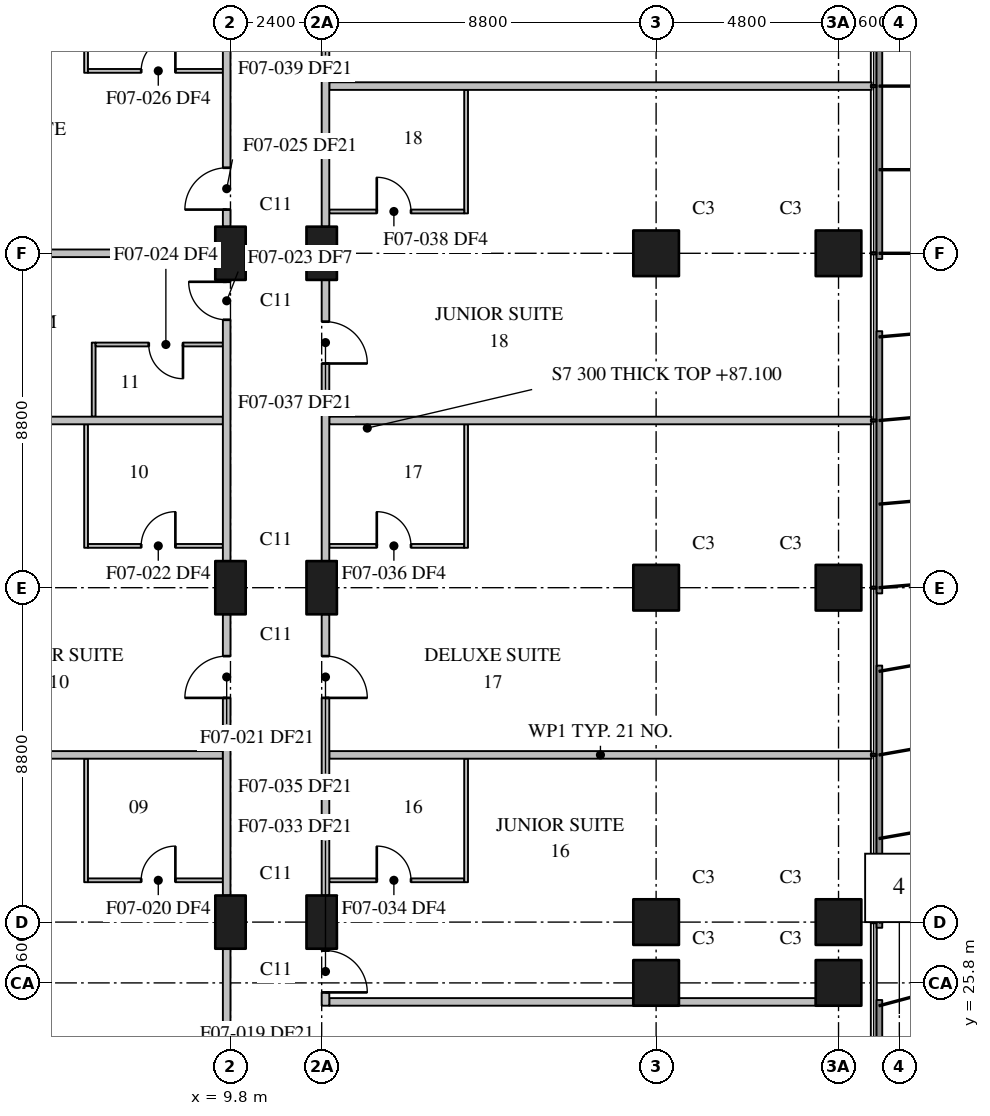
"""IFC4 building model, lengths in metres.
Left out: names, types, materials, properties, quantities, classifications, styles, units other than length and angle.
Written with IfcOpenShell. Run it as: python <this file> out.ifc"""

import sys

from ifc_helpers import new_model, si_unit, direction, frame, frame_2d, origin, origin_2d, place, context, subcontext, project, spatial, rectangle, extrude, element, fill, save


model = new_model("IFC4")
c1 = context("Model", 3, precision=1e-05, world=origin(), true_north=direction((0.0, 1.0)))
c2 = subcontext(c1, "Body", "Model", "MODEL_VIEW")
j1 = project(units=[si_unit("LENGTHUNIT", "METRE"), si_unit("PLANEANGLEUNIT", "RADIAN")], contexts=[c1])
p1 = place(None, origin())
s1 = spatial("IfcSite", under=j1, at=p1, CompositionType="ELEMENT")
p2 = place(p1, origin())
s2 = spatial("IfcBuilding", under=s1, at=p2, CompositionType="ELEMENT")
p3 = place(p2, frame((0.0, 0.0, 87.1)))
s3 = spatial("IfcBuildingStorey", under=s2, at=p3, CompositionType="ELEMENT", Elevation=87.1)
for number, where, z_axis, x_axis in (
    (1, (9.8, 27.4, 0.0), (0.0, 0.0, 1.0), (0.0, 1.0, 0.0)),
    (2, (9.8, 36.2, 0.0), (0.0, 0.0, 1.0), (0.0, 1.0, 0.0)),
    (3, (9.8, 45.0, 0.0), (0.0, 0.0, 1.0), (0.0, 1.0, 0.0)),
    (4, (12.2, 27.4, 0.0), (0.0, 0.0, 1.0), (0.0, 1.0, 0.0)),
    (5, (12.2, 36.2, 0.0), (0.0, 0.0, 1.0), (0.0, 1.0, 0.0)),
    (6, (12.2, 45.0, 0.0), (0.0, 0.0, 1.0), (0.0, 1.0, 0.0)),
):
    element("IfcColumn", number, at=place(p3, frame(where, z_axis=z_axis, x_axis=x_axis)), inside=s3, PredefinedType="COLUMN", context=c2, shape_type="SweptSolid", body=[
        extrude(rectangle(XDim=1.4, YDim=0.8, at=origin_2d()), origin(), (0.0, 0.0, 1.0), 3.7),
    ])
for number, where, z_axis, x_axis in (
    (7, (21.0, 25.8, 0.0), (0.0, 0.0, 1.0), (1.0, 0.0, 0.0)),
    (8, (21.0, 27.4, 0.0), (0.0, 0.0, 1.0), (1.0, 0.0, 0.0)),
    (9, (21.0, 36.2, 0.0), (0.0, 0.0, 1.0), (1.0, 0.0, 0.0)),
    (10, (21.0, 45.0, 0.0), (0.0, 0.0, 1.0), (1.0, 0.0, 0.0)),
    (11, (25.8, 25.8, 0.0), (0.0, 0.0, 1.0), (1.0, 0.0, 0.0)),
    (12, (25.8, 27.4, 0.0), (0.0, 0.0, 1.0), (1.0, 0.0, 0.0)),
    (13, (25.8, 36.2, 0.0), (0.0, 0.0, 1.0), (1.0, 0.0, 0.0)),
    (14, (25.8, 45.0, 0.0), (0.0, 0.0, 1.0), (1.0, 0.0, 0.0)),
):
    element("IfcColumn", number, at=place(p3, frame(where, z_axis=z_axis, x_axis=x_axis)), inside=s3, PredefinedType="COLUMN", context=c2, shape_type="SweptSolid", body=[
        extrude(rectangle(XDim=1.2, YDim=1.2, at=origin_2d()), origin(), (0.0, 0.0, 1.0), 3.7),
    ])
p4 = place(p3, frame((9.7, 21.6, 0.0), z_axis=(0.0, 0.0, 1.0), x_axis=(0.0, 1.0, 0.0)))
e15 = element("IfcWall", 15, at=p4, inside=s3, PredefinedType="PARTITIONING", context=c2, shape_type="SweptSolid", body=[
    extrude(rectangle(XDim=5.1, YDim=0.2, at=frame_2d((2.55, 0.0))), origin(), (0.0, 0.0, 1.0), 3.4),
])
p5 = place(p4, frame((0.7, 0.0, 0.0)))
e16 = element("IfcOpeningElement", 16, at=p5, cuts=e15, PredefinedType="OPENING", context=c2, shape_type="SweptSolid", body=[
    extrude(rectangle(XDim=1.1, YDim=2.1, at=frame_2d((0.55, 1.05))), frame((0.0, 0.11, 0.0), z_axis=(0.0, -1.0, 0.0), x_axis=(1.0, 0.0, 0.0)), (0.0, 0.0, 1.0), 0.22),
])
p6 = place(p3, frame((9.7, 28.1, 0.0), z_axis=(0.0, 0.0, 1.0), x_axis=(0.0, 1.0, 0.0)))
e17 = element("IfcWall", 17, at=p6, inside=s3, PredefinedType="PARTITIONING", context=c2, shape_type="SweptSolid", body=[
    extrude(rectangle(XDim=7.4, YDim=0.2, at=frame_2d((3.7, 0.0))), origin(), (0.0, 0.0, 1.0), 3.4),
])
p7 = place(p6, frame((5.2, 0.0, 0.0)))
e18 = element("IfcOpeningElement", 18, at=p7, cuts=e17, PredefinedType="OPENING", context=c2, shape_type="SweptSolid", body=[
    extrude(rectangle(XDim=1.1, YDim=2.1, at=frame_2d((0.55, 1.05))), frame((0.0, 0.11, 0.0), z_axis=(0.0, -1.0, 0.0), x_axis=(1.0, 0.0, 0.0)), (0.0, 0.0, 1.0), 0.22),
])
p8 = place(p3, frame((9.7, 36.9, 0.0), z_axis=(0.0, 0.0, 1.0), x_axis=(0.0, 1.0, 0.0)))
e19 = element("IfcWall", 19, at=p8, inside=s3, PredefinedType="PARTITIONING", context=c2, shape_type="SweptSolid", body=[
    extrude(rectangle(XDim=7.4, YDim=0.2, at=frame_2d((3.7, 0.0))), origin(), (0.0, 0.0, 1.0), 3.4),
])
p9 = place(p8, frame((6.35, 0.0, 0.0)))
e20 = element("IfcOpeningElement", 20, at=p9, cuts=e19, PredefinedType="OPENING", context=c2, shape_type="SweptSolid", body=[
    extrude(rectangle(XDim=1.0, YDim=2.1, at=frame_2d((0.5, 1.05))), frame((0.0, 0.11, 0.0), z_axis=(0.0, -1.0, 0.0), x_axis=(1.0, 0.0, 0.0)), (0.0, 0.0, 1.0), 0.22),
])
p10 = place(p3, frame((9.7, 45.7, 0.0), z_axis=(0.0, 0.0, 1.0), x_axis=(0.0, 1.0, 0.0)))
e21 = element("IfcWall", 21, at=p10, inside=s3, PredefinedType="PARTITIONING", context=c2, shape_type="SweptSolid", body=[
    extrude(rectangle(XDim=7.4, YDim=0.2, at=frame_2d((3.7, 0.0))), origin(), (0.0, 0.0, 1.0), 3.4),
])
p11 = place(p10, frame((0.45, 0.0, 0.0)))
e22 = element("IfcOpeningElement", 22, at=p11, cuts=e21, PredefinedType="OPENING", context=c2, shape_type="SweptSolid", body=[
    extrude(rectangle(XDim=1.1, YDim=2.1, at=frame_2d((0.55, 1.05))), frame((0.0, 0.11, 0.0), z_axis=(0.0, -1.0, 0.0), x_axis=(1.0, 0.0, 0.0)), (0.0, 0.0, 1.0), 0.22),
])
p12 = place(p3, frame((0.31, 31.8, 0.0), z_axis=(0.0, 0.0, 1.0), x_axis=(1.0, 0.0, 0.0)))
e23 = element("IfcWall", 23, at=p12, inside=s3, PredefinedType="PARTITIONING", context=c2, shape_type="SweptSolid", body=[
    extrude(rectangle(XDim=9.29, YDim=0.2, at=frame_2d((4.645, 0.0))), origin(), (0.0, 0.0, 1.0), 3.4),
])
p13 = place(p3, frame((12.4, 31.8, 0.0), z_axis=(0.0, 0.0, 1.0), x_axis=(1.0, 0.0, 0.0)))
e24 = element("IfcWall", 24, at=p13, inside=s3, PredefinedType="PARTITIONING", context=c2, shape_type="SweptSolid", body=[
    extrude(rectangle(XDim=14.27, YDim=0.2, at=frame_2d((7.135, 0.0))), origin(), (0.0, 0.0, 1.0), 3.4),
])
p14 = place(p3, frame((0.31, 40.6, 0.0), z_axis=(0.0, 0.0, 1.0), x_axis=(1.0, 0.0, 0.0)))
e25 = element("IfcWall", 25, at=p14, inside=s3, PredefinedType="PARTITIONING", context=c2, shape_type="SweptSolid", body=[
    extrude(rectangle(XDim=9.29, YDim=0.2, at=frame_2d((4.645, 0.0))), origin(), (0.0, 0.0, 1.0), 3.4),
])
p15 = place(p3, frame((12.4, 40.6, 0.0), z_axis=(0.0, 0.0, 1.0), x_axis=(1.0, 0.0, 0.0)))
e26 = element("IfcWall", 26, at=p15, inside=s3, PredefinedType="PARTITIONING", context=c2, shape_type="SweptSolid", body=[
    extrude(rectangle(XDim=14.27, YDim=0.2, at=frame_2d((7.135, 0.0))), origin(), (0.0, 0.0, 1.0), 3.4),
])
p16 = place(p3, frame((1.6, 45.0, 0.0), z_axis=(0.0, 0.0, 1.0), x_axis=(1.0, 0.0, 0.0)))
e27 = element("IfcWall", 27, at=p16, inside=s3, PredefinedType="PARTITIONING", context=c2, shape_type="SweptSolid", body=[
    extrude(rectangle(XDim=7.8, YDim=0.2, at=frame_2d((3.9, 0.0))), origin(), (0.0, 0.0, 1.0), 3.4),
])
p17 = place(p3, frame((12.3, 26.7, 0.0), z_axis=(0.0, 0.0, 1.0), x_axis=(0.0, -1.0, 0.0)))
e28 = element("IfcWall", 28, at=p17, inside=s3, PredefinedType="PARTITIONING", context=c2, shape_type="SweptSolid", body=[
    extrude(rectangle(XDim=1.5, YDim=0.2, at=frame_2d((0.75, 0.0))), origin(), (0.0, 0.0, 1.0), 3.4),
])
p18 = place(p17, frame((0.05, 0.0, 0.0)))
e29 = element("IfcOpeningElement", 29, at=p18, cuts=e28, PredefinedType="OPENING", context=c2, shape_type="SweptSolid", body=[
    extrude(rectangle(XDim=1.1, YDim=2.1, at=frame_2d((0.55, 1.05))), frame((0.0, 0.11, 0.0), z_axis=(0.0, -1.0, 0.0), x_axis=(1.0, 0.0, 0.0)), (0.0, 0.0, 1.0), 0.22),
])
p19 = place(p3, frame((12.3, 35.5, 0.0), z_axis=(0.0, 0.0, 1.0), x_axis=(0.0, -1.0, 0.0)))
e30 = element("IfcWall", 30, at=p19, inside=s3, PredefinedType="PARTITIONING", context=c2, shape_type="SweptSolid", body=[
    extrude(rectangle(XDim=7.4, YDim=0.2, at=frame_2d((3.7, 0.0))), origin(), (0.0, 0.0, 1.0), 3.4),
])
p20 = place(p19, frame((1.1, 0.0, 0.0)))
e31 = element("IfcOpeningElement", 31, at=p20, cuts=e30, PredefinedType="OPENING", context=c2, shape_type="SweptSolid", body=[
    extrude(rectangle(XDim=1.1, YDim=2.1, at=frame_2d((0.55, 1.05))), frame((0.0, 0.11, 0.0), z_axis=(0.0, -1.0, 0.0), x_axis=(1.0, 0.0, 0.0)), (0.0, 0.0, 1.0), 0.22),
])
p21 = place(p3, frame((12.3, 44.3, 0.0), z_axis=(0.0, 0.0, 1.0), x_axis=(0.0, -1.0, 0.0)))
e32 = element("IfcWall", 32, at=p21, inside=s3, PredefinedType="PARTITIONING", context=c2, shape_type="SweptSolid", body=[
    extrude(rectangle(XDim=7.4, YDim=0.2, at=frame_2d((3.7, 0.0))), origin(), (0.0, 0.0, 1.0), 3.4),
])
p22 = place(p21, frame((1.1, 0.0, 0.0)))
e33 = element("IfcOpeningElement", 33, at=p22, cuts=e32, PredefinedType="OPENING", context=c2, shape_type="SweptSolid", body=[
    extrude(rectangle(XDim=1.1, YDim=2.1, at=frame_2d((0.55, 1.05))), frame((0.0, 0.11, 0.0), z_axis=(0.0, -1.0, 0.0), x_axis=(1.0, 0.0, 0.0)), (0.0, 0.0, 1.0), 0.22),
])
p23 = place(p3, frame((12.3, 53.1, 0.0), z_axis=(0.0, 0.0, 1.0), x_axis=(0.0, -1.0, 0.0)))
e34 = element("IfcWall", 34, at=p23, inside=s3, PredefinedType="PARTITIONING", context=c2, shape_type="SweptSolid", body=[
    extrude(rectangle(XDim=7.4, YDim=0.2, at=frame_2d((3.7, 0.0))), origin(), (0.0, 0.0, 1.0), 3.4),
])
p24 = place(p23, frame((1.1, 0.0, 0.0)))
e35 = element("IfcOpeningElement", 35, at=p24, cuts=e34, PredefinedType="OPENING", context=c2, shape_type="SweptSolid", body=[
    extrude(rectangle(XDim=1.1, YDim=2.1, at=frame_2d((0.55, 1.05))), frame((0.0, 0.11, 0.0), z_axis=(0.0, -1.0, 0.0), x_axis=(1.0, 0.0, 0.0)), (0.0, 0.0, 1.0), 0.22),
])
p25 = place(p3, frame((12.4, 25.3, 0.0), z_axis=(0.0, 0.0, 1.0), x_axis=(1.0, 0.0, 0.0)))
e36 = element("IfcWall", 36, at=p25, inside=s3, PredefinedType="PARTITIONING", context=c2, shape_type="SweptSolid", body=[
    extrude(rectangle(XDim=8.0, YDim=0.2, at=frame_2d((4.0, 0.0))), origin(), (0.0, 0.0, 1.0), 3.4),
])
p26 = place(p3, frame((21.6, 25.3, 0.0), z_axis=(0.0, 0.0, 1.0), x_axis=(1.0, 0.0, 0.0)))
e37 = element("IfcWall", 37, at=p26, inside=s3, PredefinedType="PARTITIONING", context=c2, shape_type="SweptSolid", body=[
    extrude(rectangle(XDim=3.6, YDim=0.2, at=frame_2d((1.8, 0.0))), origin(), (0.0, 0.0, 1.0), 3.4),
])
p27 = place(p3, frame((12.4, 49.4, 0.0), z_axis=(0.0, 0.0, 1.0), x_axis=(1.0, 0.0, 0.0)))
e38 = element("IfcWall", 38, at=p27, inside=s3, PredefinedType="PARTITIONING", context=c2, shape_type="SweptSolid", body=[
    extrude(rectangle(XDim=14.27, YDim=0.2, at=frame_2d((7.135, 0.0))), origin(), (0.0, 0.0, 1.0), 3.4),
])
p28 = place(p3, frame((6.2, 40.7, 0.0), z_axis=(0.0, 0.0, 1.0), x_axis=(0.0, 1.0, 0.0)))
e39 = element("IfcWall", 39, at=p28, inside=s3, PredefinedType="PARTITIONING", context=c2, shape_type="SweptSolid", body=[
    extrude(rectangle(XDim=1.95, YDim=0.1, at=frame_2d((0.975, 0.0))), origin(), (0.0, 0.0, 1.0), 3.4),
])
for number, where, z_axis, x_axis in (
    (40, (6.0, 28.45, 0.0), (0.0, 0.0, 1.0), (0.0, 1.0, 0.0)),
    (41, (6.0, 37.25, 0.0), (0.0, 0.0, 1.0), (0.0, 1.0, 0.0)),
):
    element("IfcWall", number, at=place(p3, frame(where, z_axis=z_axis, x_axis=x_axis)), inside=s3, PredefinedType="PARTITIONING", context=c2, shape_type="SweptSolid", body=[
        extrude(rectangle(XDim=3.25, YDim=0.1, at=frame_2d((1.625, 0.0))), origin(), (0.0, 0.0, 1.0), 3.4),
    ])
p29 = place(p3, frame((6.0, 49.75, 0.0), z_axis=(0.0, 0.0, 1.0), x_axis=(0.0, 1.0, 0.0)))
e42 = element("IfcWall", 42, at=p29, inside=s3, PredefinedType="PARTITIONING", context=c2, shape_type="SweptSolid", body=[
    extrude(rectangle(XDim=3.4, YDim=0.1, at=frame_2d((1.7, 0.0))), origin(), (0.0, 0.0, 1.0), 3.4),
])
p30 = place(p3, frame((6.05, 28.5, 0.0), z_axis=(0.0, 0.0, 1.0), x_axis=(1.0, 0.0, 0.0)))
e43 = element("IfcWall", 43, at=p30, inside=s3, PredefinedType="PARTITIONING", context=c2, shape_type="SweptSolid", body=[
    extrude(rectangle(XDim=3.55, YDim=0.1, at=frame_2d((1.775, 0.0))), origin(), (0.0, 0.0, 1.0), 3.4),
])
p31 = place(p30, frame((1.4, 0.0, 0.0)))
e44 = element("IfcOpeningElement", 44, at=p31, cuts=e43, PredefinedType="OPENING", context=c2, shape_type="SweptSolid", body=[
    extrude(rectangle(XDim=0.9, YDim=2.1, at=frame_2d((0.45, 1.05))), frame((0.0, 0.06, 0.0), z_axis=(0.0, -1.0, 0.0), x_axis=(1.0, 0.0, 0.0)), (0.0, 0.0, 1.0), 0.12),
])
p32 = place(p3, frame((12.4, 28.5, 0.0), z_axis=(0.0, 0.0, 1.0), x_axis=(1.0, 0.0, 0.0)))
e45 = element("IfcWall", 45, at=p32, inside=s3, PredefinedType="PARTITIONING", context=c2, shape_type="SweptSolid", body=[
    extrude(rectangle(XDim=3.55, YDim=0.1, at=frame_2d((1.775, 0.0))), origin(), (0.0, 0.0, 1.0), 3.4),
])
p33 = place(p32, frame((1.25, 0.0, 0.0)))
e46 = element("IfcOpeningElement", 46, at=p33, cuts=e45, PredefinedType="OPENING", context=c2, shape_type="SweptSolid", body=[
    extrude(rectangle(XDim=0.9, YDim=2.1, at=frame_2d((0.45, 1.05))), frame((0.0, 0.06, 0.0), z_axis=(0.0, -1.0, 0.0), x_axis=(1.0, 0.0, 0.0)), (0.0, 0.0, 1.0), 0.12),
])
p34 = place(p3, frame((6.05, 37.3, 0.0), z_axis=(0.0, 0.0, 1.0), x_axis=(1.0, 0.0, 0.0)))
e47 = element("IfcWall", 47, at=p34, inside=s3, PredefinedType="PARTITIONING", context=c2, shape_type="SweptSolid", body=[
    extrude(rectangle(XDim=3.55, YDim=0.1, at=frame_2d((1.775, 0.0))), origin(), (0.0, 0.0, 1.0), 3.4),
])
p35 = place(p34, frame((1.4, 0.0, 0.0)))
e48 = element("IfcOpeningElement", 48, at=p35, cuts=e47, PredefinedType="OPENING", context=c2, shape_type="SweptSolid", body=[
    extrude(rectangle(XDim=0.9, YDim=2.1, at=frame_2d((0.45, 1.05))), frame((0.0, 0.06, 0.0), z_axis=(0.0, -1.0, 0.0), x_axis=(1.0, 0.0, 0.0)), (0.0, 0.0, 1.0), 0.12),
])
p36 = place(p3, frame((12.4, 37.3, 0.0), z_axis=(0.0, 0.0, 1.0), x_axis=(1.0, 0.0, 0.0)))
e49 = element("IfcWall", 49, at=p36, inside=s3, PredefinedType="PARTITIONING", context=c2, shape_type="SweptSolid", body=[
    extrude(rectangle(XDim=3.55, YDim=0.1, at=frame_2d((1.775, 0.0))), origin(), (0.0, 0.0, 1.0), 3.4),
])
p37 = place(p36, frame((1.25, 0.0, 0.0)))
e50 = element("IfcOpeningElement", 50, at=p37, cuts=e49, PredefinedType="OPENING", context=c2, shape_type="SweptSolid", body=[
    extrude(rectangle(XDim=0.9, YDim=2.1, at=frame_2d((0.45, 1.05))), frame((0.0, 0.06, 0.0), z_axis=(0.0, -1.0, 0.0), x_axis=(1.0, 0.0, 0.0)), (0.0, 0.0, 1.0), 0.12),
])
p38 = place(p3, frame((9.6, 42.6, 0.0), z_axis=(0.0, 0.0, 1.0), x_axis=(-1.0, 0.0, 0.0)))
e51 = element("IfcWall", 51, at=p38, inside=s3, PredefinedType="PARTITIONING", context=c2, shape_type="SweptSolid", body=[
    extrude(rectangle(XDim=3.35, YDim=0.1, at=frame_2d((1.675, 0.0))), origin(), (0.0, 0.0, 1.0), 3.4),
])
p39 = place(p38, frame((1.05, 0.0, 0.0)))
e52 = element("IfcOpeningElement", 52, at=p39, cuts=e51, PredefinedType="OPENING", context=c2, shape_type="SweptSolid", body=[
    extrude(rectangle(XDim=0.9, YDim=2.1, at=frame_2d((0.45, 1.05))), frame((0.0, 0.06, 0.0), z_axis=(0.0, -1.0, 0.0), x_axis=(1.0, 0.0, 0.0)), (0.0, 0.0, 1.0), 0.12),
])
p40 = place(p3, frame((6.05, 49.8, 0.0), z_axis=(0.0, 0.0, 1.0), x_axis=(1.0, 0.0, 0.0)))
e53 = element("IfcWall", 53, at=p40, inside=s3, PredefinedType="PARTITIONING", context=c2, shape_type="SweptSolid", body=[
    extrude(rectangle(XDim=3.55, YDim=0.1, at=frame_2d((1.775, 0.0))), origin(), (0.0, 0.0, 1.0), 3.4),
])
p41 = place(p40, frame((1.4, 0.0, 0.0)))
e54 = element("IfcOpeningElement", 54, at=p41, cuts=e53, PredefinedType="OPENING", context=c2, shape_type="SweptSolid", body=[
    extrude(rectangle(XDim=0.9, YDim=2.1, at=frame_2d((0.45, 1.05))), frame((0.0, 0.06, 0.0), z_axis=(0.0, -1.0, 0.0), x_axis=(1.0, 0.0, 0.0)), (0.0, 0.0, 1.0), 0.12),
])
for number, where, z_axis, x_axis in (
    (55, (16.0, 28.45, 0.0), (0.0, 0.0, 1.0), (0.0, 1.0, 0.0)),
    (56, (16.0, 37.25, 0.0), (0.0, 0.0, 1.0), (0.0, 1.0, 0.0)),
    (57, (16.0, 46.05, 0.0), (0.0, 0.0, 1.0), (0.0, 1.0, 0.0)),
):
    element("IfcWall", number, at=place(p3, frame(where, z_axis=z_axis, x_axis=x_axis)), inside=s3, PredefinedType="PARTITIONING", context=c2, shape_type="SweptSolid", body=[
        extrude(rectangle(XDim=3.25, YDim=0.1, at=frame_2d((1.625, 0.0))), origin(), (0.0, 0.0, 1.0), 3.4),
    ])
p42 = place(p3, frame((12.4, 46.1, 0.0), z_axis=(0.0, 0.0, 1.0), x_axis=(1.0, 0.0, 0.0)))
e58 = element("IfcWall", 58, at=p42, inside=s3, PredefinedType="PARTITIONING", context=c2, shape_type="SweptSolid", body=[
    extrude(rectangle(XDim=3.55, YDim=0.1, at=frame_2d((1.775, 0.0))), origin(), (0.0, 0.0, 1.0), 3.4),
])
p43 = place(p42, frame((1.25, 0.0, 0.0)))
e59 = element("IfcOpeningElement", 59, at=p43, cuts=e58, PredefinedType="OPENING", context=c2, shape_type="SweptSolid", body=[
    extrude(rectangle(XDim=0.9, YDim=2.1, at=frame_2d((0.45, 1.05))), frame((0.0, 0.06, 0.0), z_axis=(0.0, -1.0, 0.0), x_axis=(1.0, 0.0, 0.0)), (0.0, 0.0, 1.0), 0.12),
])
p44 = place(p31, origin())
e60 = element("IfcDoor", 60, at=p44, inside=s3, OperationType="SINGLE_SWING_RIGHT", PredefinedType="DOOR", context=c2, shape_type="SweptSolid", body=[
    extrude(rectangle(XDim=0.9, YDim=2.1, at=frame_2d((0.45, 1.05))), frame((0.0, 0.025, 0.0), z_axis=(0.0, -1.0, 0.0), x_axis=(1.0, 0.0, 0.0)), (0.0, 0.0, 1.0), 0.05),
])
fill(e44, e60)
p45 = place(p7, origin())
e61 = element("IfcDoor", 61, at=p45, inside=s3, OperationType="SINGLE_SWING_LEFT", PredefinedType="DOOR", context=c2, shape_type="SweptSolid", body=[
    extrude(rectangle(XDim=1.1, YDim=2.1, at=frame_2d((0.55, 1.05))), frame((0.0, 0.025, 0.0), z_axis=(0.0, -1.0, 0.0), x_axis=(1.0, 0.0, 0.0)), (0.0, 0.0, 1.0), 0.05),
])
fill(e18, e61)
p46 = place(p35, origin())
e62 = element("IfcDoor", 62, at=p46, inside=s3, OperationType="SINGLE_SWING_RIGHT", PredefinedType="DOOR", context=c2, shape_type="SweptSolid", body=[
    extrude(rectangle(XDim=0.9, YDim=2.1, at=frame_2d((0.45, 1.05))), frame((0.0, 0.025, 0.0), z_axis=(0.0, -1.0, 0.0), x_axis=(1.0, 0.0, 0.0)), (0.0, 0.0, 1.0), 0.05),
])
fill(e48, e62)
p47 = place(p9, origin())
e63 = element("IfcDoor", 63, at=p47, inside=s3, OperationType="SINGLE_SWING_RIGHT", PredefinedType="DOOR", context=c2, shape_type="SweptSolid", body=[
    extrude(rectangle(XDim=1.0, YDim=2.1, at=frame_2d((0.5, 1.05))), frame((0.0, 0.025, 0.0), z_axis=(0.0, -1.0, 0.0), x_axis=(1.0, 0.0, 0.0)), (0.0, 0.0, 1.0), 0.05),
])
fill(e20, e63)
p48 = place(p39, origin())
e64 = element("IfcDoor", 64, at=p48, inside=s3, OperationType="SINGLE_SWING_LEFT", PredefinedType="DOOR", context=c2, shape_type="SweptSolid", body=[
    extrude(rectangle(XDim=0.9, YDim=2.1, at=frame_2d((0.45, 1.05))), frame((0.0, 0.025, 0.0), z_axis=(0.0, -1.0, 0.0), x_axis=(1.0, 0.0, 0.0)), (0.0, 0.0, 1.0), 0.05),
])
fill(e52, e64)
p49 = place(p11, origin())
e65 = element("IfcDoor", 65, at=p49, inside=s3, OperationType="SINGLE_SWING_LEFT", PredefinedType="DOOR", context=c2, shape_type="SweptSolid", body=[
    extrude(rectangle(XDim=1.1, YDim=2.1, at=frame_2d((0.55, 1.05))), frame((0.0, 0.025, 0.0), z_axis=(0.0, -1.0, 0.0), x_axis=(1.0, 0.0, 0.0)), (0.0, 0.0, 1.0), 0.05),
])
fill(e22, e65)
p50 = place(p41, origin())
e66 = element("IfcDoor", 66, at=p50, inside=s3, OperationType="SINGLE_SWING_RIGHT", PredefinedType="DOOR", context=c2, shape_type="SweptSolid", body=[
    extrude(rectangle(XDim=0.9, YDim=2.1, at=frame_2d((0.45, 1.05))), frame((0.0, 0.025, 0.0), z_axis=(0.0, -1.0, 0.0), x_axis=(1.0, 0.0, 0.0)), (0.0, 0.0, 1.0), 0.05),
])
fill(e54, e66)
p51 = place(p18, origin())
e67 = element("IfcDoor", 67, at=p51, inside=s3, OperationType="SINGLE_SWING_RIGHT", PredefinedType="DOOR", context=c2, shape_type="SweptSolid", body=[
    extrude(rectangle(XDim=1.1, YDim=2.1, at=frame_2d((0.55, 1.05))), frame((0.0, 0.025, 0.0), z_axis=(0.0, -1.0, 0.0), x_axis=(1.0, 0.0, 0.0)), (0.0, 0.0, 1.0), 0.05),
])
fill(e29, e67)
p52 = place(p33, origin())
e68 = element("IfcDoor", 68, at=p52, inside=s3, OperationType="SINGLE_SWING_LEFT", PredefinedType="DOOR", context=c2, shape_type="SweptSolid", body=[
    extrude(rectangle(XDim=0.9, YDim=2.1, at=frame_2d((0.45, 1.05))), frame((0.0, 0.025, 0.0), z_axis=(0.0, -1.0, 0.0), x_axis=(1.0, 0.0, 0.0)), (0.0, 0.0, 1.0), 0.05),
])
fill(e46, e68)
p53 = place(p20, origin())
e69 = element("IfcDoor", 69, at=p53, inside=s3, OperationType="SINGLE_SWING_RIGHT", PredefinedType="DOOR", context=c2, shape_type="SweptSolid", body=[
    extrude(rectangle(XDim=1.1, YDim=2.1, at=frame_2d((0.55, 1.05))), frame((0.0, 0.025, 0.0), z_axis=(0.0, -1.0, 0.0), x_axis=(1.0, 0.0, 0.0)), (0.0, 0.0, 1.0), 0.05),
])
fill(e31, e69)
p54 = place(p37, origin())
e70 = element("IfcDoor", 70, at=p54, inside=s3, OperationType="SINGLE_SWING_LEFT", PredefinedType="DOOR", context=c2, shape_type="SweptSolid", body=[
    extrude(rectangle(XDim=0.9, YDim=2.1, at=frame_2d((0.45, 1.05))), frame((0.0, 0.025, 0.0), z_axis=(0.0, -1.0, 0.0), x_axis=(1.0, 0.0, 0.0)), (0.0, 0.0, 1.0), 0.05),
])
fill(e50, e70)
p55 = place(p22, origin())
e71 = element("IfcDoor", 71, at=p55, inside=s3, OperationType="SINGLE_SWING_RIGHT", PredefinedType="DOOR", context=c2, shape_type="SweptSolid", body=[
    extrude(rectangle(XDim=1.1, YDim=2.1, at=frame_2d((0.55, 1.05))), frame((0.0, 0.025, 0.0), z_axis=(0.0, -1.0, 0.0), x_axis=(1.0, 0.0, 0.0)), (0.0, 0.0, 1.0), 0.05),
])
fill(e33, e71)
p56 = place(p43, origin())
e72 = element("IfcDoor", 72, at=p56, inside=s3, OperationType="SINGLE_SWING_LEFT", PredefinedType="DOOR", context=c2, shape_type="SweptSolid", body=[
    extrude(rectangle(XDim=0.9, YDim=2.1, at=frame_2d((0.45, 1.05))), frame((0.0, 0.025, 0.0), z_axis=(0.0, -1.0, 0.0), x_axis=(1.0, 0.0, 0.0)), (0.0, 0.0, 1.0), 0.05),
])
fill(e59, e72)
save(model, sys.argv[1])
